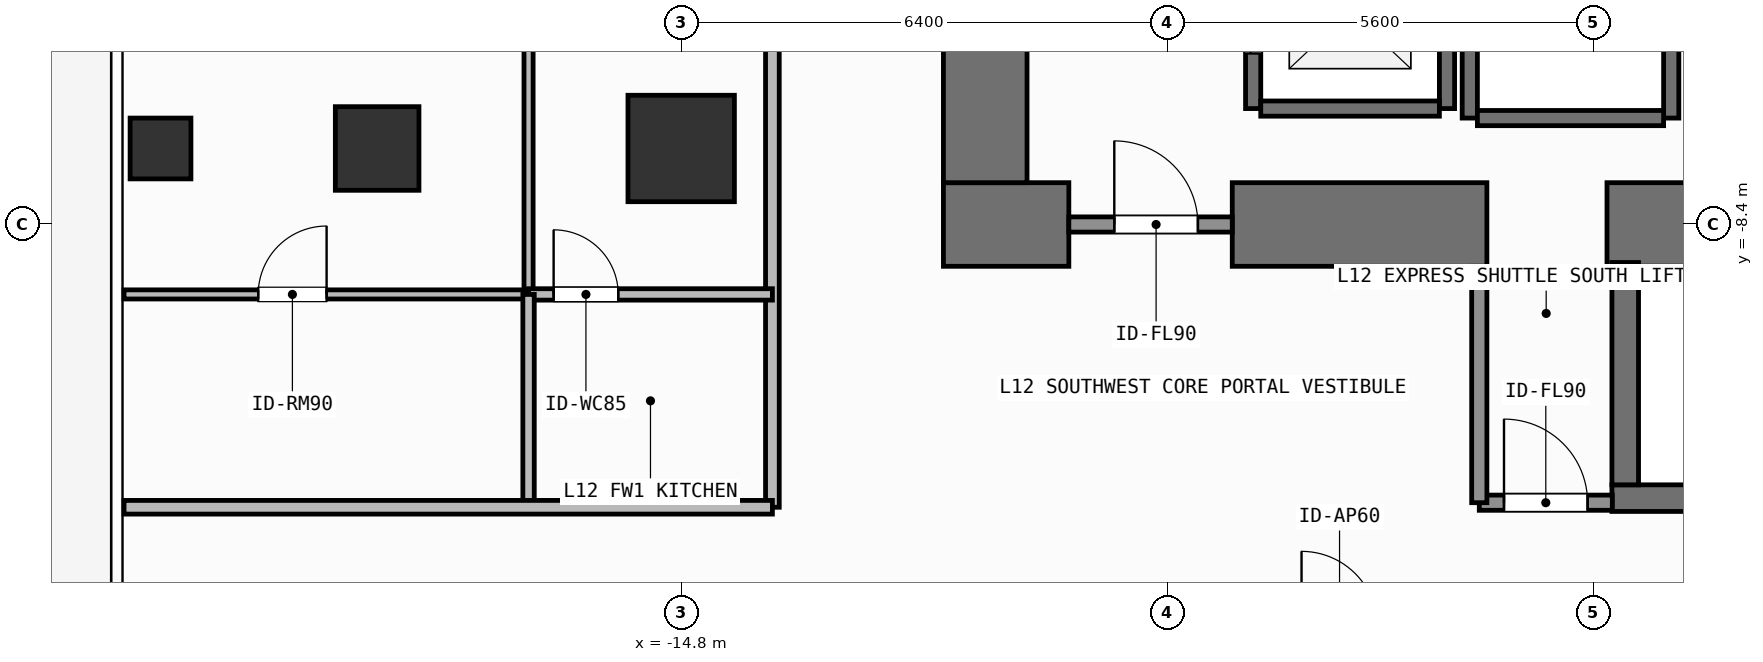
"""IFC4 building model, lengths in metres.
Left out: names, types, materials, properties, quantities, classifications, styles, units other than length and angle.
Written with IfcOpenShell. Run it as: python <this file> out.ifc"""

import sys

from ifc_helpers import new_model, si_unit, direction, frame, frame_2d, origin, origin_2d, place, context, subcontext, project, spatial, rectangle, hollow_rectangle, extrude, element, fill, save


model = new_model("IFC4")
c1 = context("Model", 3, precision=1e-05, world=origin(), true_north=direction((0.0, 1.0)))
c2 = subcontext(c1, "Body", "Model", "MODEL_VIEW")
j1 = project(units=[si_unit("LENGTHUNIT", "METRE"), si_unit("PLANEANGLEUNIT", "RADIAN")], contexts=[c1])
p1 = place(None, origin())
s1 = spatial("IfcSite", under=j1, at=p1, CompositionType="ELEMENT")
p2 = place(p1, origin())
s2 = spatial("IfcBuilding", under=s1, at=p2, CompositionType="ELEMENT")
p3 = place(p2, frame((0.0, 0.0, 46.2)))
s3 = spatial("IfcBuildingStorey", under=s2, at=p3, CompositionType="ELEMENT", Elevation=46.2)
p4 = place(p3, frame((-11.35, -8.4, 0.0), z_axis=(0.0, 0.0, 1.0), x_axis=(1.0, 0.0, 0.0)))
e1 = element("IfcWall", 1, at=p4, inside=s3, PredefinedType="SHEAR", context=c2, shape_type="SweptSolid", body=[
    extrude(rectangle(XDim=1.65, YDim=1.1, at=frame_2d((0.825, 0.0))), origin(), (0.0, 0.0, 1.0), 3.9),
])
p5 = place(p3, frame((-7.55, -8.4, 0.0), z_axis=(0.0, 0.0, 1.0), x_axis=(1.0, 0.0, 0.0)))
e2 = element("IfcWall", 2, at=p5, inside=s3, PredefinedType="SHEAR", context=c2, shape_type="SweptSolid", body=[
    extrude(rectangle(XDim=3.35, YDim=1.1, at=frame_2d((1.675, 0.0))), origin(), (0.0, 0.0, 1.0), 3.9),
])
p6 = place(p3, frame((-2.62, -8.4, 0.0), z_axis=(0.0, 0.0, 1.0), x_axis=(1.0, 0.0, 0.0)))
e3 = element("IfcWall", 3, at=p6, inside=s3, PredefinedType="SHEAR", context=c2, shape_type="SweptSolid", body=[
    extrude(rectangle(XDim=7.27, YDim=1.1, at=frame_2d((3.635, 0.0))), origin(), (0.0, 0.0, 1.0), 3.9),
])
p7 = place(p3, frame((-10.8, -7.85, 0.0), z_axis=(0.0, 0.0, 1.0), x_axis=(0.0, 1.0, 0.0)))
e4 = element("IfcWall", 4, at=p7, inside=s3, PredefinedType="SHEAR", context=c2, shape_type="SweptSolid", body=[
    extrude(rectangle(XDim=15.7, YDim=1.1, at=frame_2d((7.85, 0.0))), origin(), (0.0, 0.0, 1.0), 3.9),
])
p8 = place(p3, frame((-2.555, -12.0, 0.0), z_axis=(0.0, 0.0, 1.0), x_axis=(1.0, 0.0, 0.0)))
e5 = element("IfcWall", 5, at=p8, inside=s3, PredefinedType="SHEAR", context=c2, shape_type="SweptSolid", body=[
    extrude(rectangle(XDim=7.31, YDim=0.35, at=frame_2d((3.655, 0.0))), origin(), (0.0, 0.0, 1.0), 3.9),
])
p9 = place(p3, frame((-2.2, -8.988, 0.0), z_axis=(0.0, 0.0, 1.0), x_axis=(1.0, 0.0, 0.0)))
e6 = element("IfcWall", 6, at=p9, inside=s3, PredefinedType="SHEAR", context=c2, shape_type="SweptSolid", body=[
    extrude(rectangle(XDim=6.6, YDim=0.075, at=frame_2d((3.3, 0.0))), origin(), (0.0, 0.0, 1.0), 3.9),
])
p10 = place(p3, frame((-2.38, -11.825, 0.0), z_axis=(0.0, 0.0, 1.0), x_axis=(0.0, 1.0, 0.0)))
e7 = element("IfcWall", 7, at=p10, inside=s3, PredefinedType="SHEAR", context=c2, shape_type="SweptSolid", body=[
    extrude(rectangle(XDim=2.925, YDim=0.35, at=frame_2d((1.462, 0.0))), origin(), (0.0, 0.0, 1.0), 3.9),
])
p11 = place(p3, frame((-14.8, -7.4, 0.0), z_axis=(0.0, 0.0, 1.0), x_axis=(1.0, 0.0, 0.0)))
e8 = element("IfcColumn", 8, at=p11, inside=s3, PredefinedType="COLUMN", context=c2, shape_type="SweptSolid", body=[
    extrude(rectangle(XDim=1.4, YDim=1.4, at=origin_2d()), origin(), (0.0, 0.0, 1.0), 3.9),
])
p12 = place(p3, frame((-18.8, -7.4, 0.0), z_axis=(0.0, 0.0, 1.0), x_axis=(1.0, 0.0, 0.0)))
e9 = element("IfcColumn", 9, at=p12, inside=s3, PredefinedType="COLUMN", context=c2, shape_type="SweptSolid", body=[
    extrude(rectangle(XDim=1.1, YDim=1.1, at=origin_2d()), origin(), (0.0, 0.0, 1.0), 3.9),
])
p13 = place(p3, frame((-21.65, -7.4, 0.0), z_axis=(0.0, 0.0, 1.0), x_axis=(1.0, 0.0, 0.0)))
e10 = element("IfcColumn", 10, at=p13, inside=s3, PredefinedType="COLUMN", context=c2, shape_type="SweptSolid", body=[
    extrude(hollow_rectangle(XDim=0.8, YDim=0.8, WallThickness=0.036, at=origin_2d()), origin(), (0.0, 0.0, 1.0), 3.9),
])
p14 = place(p3, frame((-7.275, -6.875, 0.0), z_axis=(0.0, 0.0, 1.0), x_axis=(0.0, 1.0, 0.0)))
e11 = element("IfcWall", 11, at=p14, inside=s3, PredefinedType="SHEAR", context=c2, shape_type="SweptSolid", body=[
    extrude(rectangle(XDim=2.55, YDim=0.2, at=frame_2d((1.275, 0.0))), origin(), (0.0, 0.0, 1.0), 3.68),
])
p15 = place(p14, frame((0.725, 0.0, 0.0)))
e12 = element("IfcOpeningElement", 12, at=p15, cuts=e11, PredefinedType="OPENING", context=c2, shape_type="SweptSolid", body=[
    extrude(rectangle(XDim=1.1, YDim=2.2, at=frame_2d((0.55, 1.1))), frame((0.0, 0.11, 0.0), z_axis=(0.0, -1.0, 0.0), x_axis=(1.0, 0.0, 0.0)), (0.0, 0.0, 1.0), 0.22),
])
p16 = place(p3, frame((-4.725, -6.875, 0.0), z_axis=(0.0, 0.0, 1.0), x_axis=(0.0, 1.0, 0.0)))
e13 = element("IfcWall", 13, at=p16, inside=s3, PredefinedType="SHEAR", context=c2, shape_type="SweptSolid", body=[
    extrude(rectangle(XDim=2.55, YDim=0.2, at=frame_2d((1.275, 0.0))), origin(), (0.0, 0.0, 1.0), 3.68),
])
p17 = place(p3, frame((-7.175, -6.875, 0.0), z_axis=(0.0, 0.0, 1.0), x_axis=(1.0, 0.0, 0.0)))
e14 = element("IfcWall", 14, at=p17, inside=s3, PredefinedType="SHEAR", context=c2, shape_type="SweptSolid", body=[
    extrude(rectangle(XDim=2.35, YDim=0.2, at=frame_2d((1.175, 0.0))), origin(), (0.0, 0.0, 1.0), 3.68),
])
for number, where, z_axis, x_axis in (
    (15, (-4.425, -7.0, 0.0), (0.0, 0.0, 1.0), (0.0, 1.0, 0.0)),
    (16, (-1.775, -7.0, 0.0), (0.0, 0.0, 1.0), (0.0, 1.0, 0.0)),
):
    element("IfcWall", number, at=place(p3, frame(where, z_axis=z_axis, x_axis=x_axis)), inside=s3, PredefinedType="SHEAR", context=c2, shape_type="SweptSolid", body=[
        extrude(rectangle(XDim=2.8, YDim=0.2, at=frame_2d((1.4, 0.0))), origin(), (0.0, 0.0, 1.0), 3.68),
    ])
p18 = place(p3, frame((-4.325, -7.0, 0.0), z_axis=(0.0, 0.0, 1.0), x_axis=(1.0, 0.0, 0.0)))
e17 = element("IfcWall", 17, at=p18, inside=s3, PredefinedType="SHEAR", context=c2, shape_type="SweptSolid", body=[
    extrude(rectangle(XDim=2.45, YDim=0.2, at=frame_2d((1.225, 0.0))), origin(), (0.0, 0.0, 1.0), 3.68),
])
p19 = place(p3, frame((-9.7, -8.4, 0.0), z_axis=(0.0, 0.0, 1.0), x_axis=(1.0, 0.0, 0.0)))
e18 = element("IfcWall", 18, at=p19, inside=s3, PredefinedType="SOLIDWALL", context=c2, shape_type="SweptSolid", body=[
    extrude(rectangle(XDim=2.15, YDim=0.2, at=frame_2d((1.075, 0.0))), origin(), (0.0, 0.0, 1.0), 2.72),
])
p20 = place(p19, frame((0.598, 0.0, 0.0)))
e19 = element("IfcOpeningElement", 19, at=p20, cuts=e18, PredefinedType="OPENING", context=c2, shape_type="SweptSolid", body=[
    extrude(rectangle(XDim=1.1, YDim=2.15, at=frame_2d((0.55, 1.075))), frame((0.0, 0.11, 0.0), z_axis=(0.0, -1.0, 0.0), x_axis=(1.0, 0.0, 0.0)), (0.0, 0.0, 1.0), 0.22),
])
p21 = place(p3, frame((-4.3, -12.06, 0.0), z_axis=(0.0, 0.0, 1.0), x_axis=(1.0, 0.0, 0.0)))
e20 = element("IfcWall", 20, at=p21, inside=s3, PredefinedType="SOLIDWALL", context=c2, shape_type="SweptSolid", body=[
    extrude(rectangle(XDim=1.75, YDim=0.2, at=frame_2d((0.875, 0.0))), origin(), (0.0, 0.0, 1.0), 3.68),
])
p22 = place(p21, frame((0.325, 0.0, 0.0)))
e21 = element("IfcOpeningElement", 21, at=p22, cuts=e20, PredefinedType="OPENING", context=c2, shape_type="SweptSolid", body=[
    extrude(rectangle(XDim=1.1, YDim=2.15, at=frame_2d((0.55, 1.075))), frame((0.0, 0.11, 0.0), z_axis=(0.0, -1.0, 0.0), x_axis=(1.0, 0.0, 0.0)), (0.0, 0.0, 1.0), 0.22),
])
p23 = place(p3, frame((-13.6, -12.12, 0.0), z_axis=(0.0, 0.0, 1.0), x_axis=(0.0, 1.0, 0.0)))
e22 = element("IfcWall", 22, at=p23, inside=s3, PredefinedType="PARTITIONING", context=c2, shape_type="SweptSolid", body=[
    extrude(rectangle(XDim=24.24, YDim=0.18, at=frame_2d((12.12, 0.0))), origin(), (0.0, 0.0, 1.0), 3.68),
])
p24 = place(p23, frame((9.829, 0.0, 0.0)))
e23 = element("IfcOpeningElement", 23, at=p24, cuts=e22, PredefinedType="OPENING", context=c2, shape_type="SweptSolid", body=[
    extrude(rectangle(XDim=1.0, YDim=2.2, at=frame_2d((0.5, 1.1))), frame((0.0, 0.1, 0.0), z_axis=(0.0, -1.0, 0.0), x_axis=(1.0, 0.0, 0.0)), (0.0, 0.0, 1.0), 0.2),
])
p25 = place(p3, frame((-16.808, -9.32, 0.0), z_axis=(0.0, 0.0, 1.0), x_axis=(0.0, 1.0, 0.0)))
e24 = element("IfcWall", 24, at=p25, inside=s3, PredefinedType="PARTITIONING", context=c2, shape_type="SweptSolid", body=[
    extrude(rectangle(XDim=14.756, YDim=0.12, at=frame_2d((7.378, 0.0))), origin(), (0.0, 0.0, 1.0), 3.68),
])
p26 = place(p25, frame((6.928, 0.0, 0.0)))
e25 = element("IfcOpeningElement", 25, at=p26, cuts=e24, PredefinedType="OPENING", context=c2, shape_type="SweptSolid", body=[
    extrude(rectangle(XDim=0.9, YDim=2.1, at=frame_2d((0.45, 1.05))), frame((0.0, 0.07, 0.0), z_axis=(0.0, -1.0, 0.0), x_axis=(1.0, 0.0, 0.0)), (0.0, 0.0, 1.0), 0.14),
])
p27 = place(p3, frame((-16.808, -9.32, 0.0), z_axis=(0.0, 0.0, 1.0), x_axis=(1.0, 0.0, 0.0)))
e26 = element("IfcWall", 26, at=p27, inside=s3, PredefinedType="PARTITIONING", context=c2, shape_type="SweptSolid", body=[
    extrude(rectangle(XDim=3.208, YDim=0.15, at=frame_2d((1.604, 0.0))), origin(), (0.0, 0.0, 1.0), 3.68),
])
p28 = place(p27, frame((0.33, 0.0, 0.0)))
e27 = element("IfcOpeningElement", 27, at=p28, cuts=e26, PredefinedType="OPENING", context=c2, shape_type="SweptSolid", body=[
    extrude(rectangle(XDim=0.85, YDim=2.1, at=frame_2d((0.425, 1.05))), frame((0.0, 0.085, 0.0), z_axis=(0.0, -1.0, 0.0), x_axis=(1.0, 0.0, 0.0)), (0.0, 0.0, 1.0), 0.17),
])
p29 = place(p3, frame((-22.13, -9.32, 0.0), z_axis=(0.0, 0.0, 1.0), x_axis=(1.0, 0.0, 0.0)))
e28 = element("IfcWall", 28, at=p29, inside=s3, PredefinedType="PARTITIONING", context=c2, shape_type="SweptSolid", body=[
    extrude(rectangle(XDim=5.322, YDim=0.12, at=frame_2d((2.661, 0.0))), origin(), (0.0, 0.0, 1.0), 3.68),
])
p30 = place(p29, frame((1.765, 0.0, 0.0)))
e29 = element("IfcOpeningElement", 29, at=p30, cuts=e28, PredefinedType="OPENING", context=c2, shape_type="SweptSolid", body=[
    extrude(rectangle(XDim=0.9, YDim=2.1, at=frame_2d((0.45, 1.05))), frame((0.0, 0.07, 0.0), z_axis=(0.0, -1.0, 0.0), x_axis=(1.0, 0.0, 0.0)), (0.0, 0.0, 1.0), 0.14),
])
p31 = place(p3, frame((-4.3, -12.06, 0.0), z_axis=(0.0, 0.0, 1.0), x_axis=(0.0, 1.0, 0.0)))
e30 = element("IfcWall", 30, at=p31, inside=s3, PredefinedType="SOLIDWALL", context=c2, shape_type="SweptSolid", body=[
    extrude(rectangle(XDim=3.11, YDim=0.2, at=frame_2d((1.555, 0.0))), origin(), (0.0, 0.0, 1.0), 3.68),
])
p32 = place(p3, frame((-16.808, -12.12, 0.0), z_axis=(0.0, 0.0, 1.0), x_axis=(0.0, 1.0, 0.0)))
e31 = element("IfcWall", 31, at=p32, inside=s3, PredefinedType="PARTITIONING", context=c2, shape_type="SweptSolid", body=[
    extrude(rectangle(XDim=2.8, YDim=0.15, at=frame_2d((1.4, 0.0))), origin(), (0.0, 0.0, 1.0), 3.68),
])
p33 = place(p3, frame((-22.13, -12.12, 0.0), z_axis=(0.0, 0.0, 1.0), x_axis=(1.0, 0.0, 0.0)))
e32 = element("IfcWall", 32, at=p33, inside=s3, PredefinedType="PARTITIONING", context=c2, shape_type="SweptSolid", body=[
    extrude(rectangle(XDim=8.53, YDim=0.18, at=frame_2d((4.265, 0.0))), origin(), (0.0, 0.0, 1.0), 3.68),
])
p34 = place(p15, origin())
e33 = element("IfcDoor", 33, at=p34, inside=s3, OperationType="SLIDING_TO_LEFT", PredefinedType="DOOR", context=c2, shape_type="SweptSolid", body=[
    extrude(rectangle(XDim=1.1, YDim=2.2, at=frame_2d((0.55, 1.1))), frame((0.0, 0.025, 0.0), z_axis=(0.0, -1.0, 0.0), x_axis=(1.0, 0.0, 0.0)), (0.0, 0.0, 1.0), 0.05),
])
fill(e12, e33)
p35 = place(p20, origin())
e34 = element("IfcDoor", 34, at=p35, inside=s3, OperationType="SINGLE_SWING_LEFT", PredefinedType="DOOR", context=c2, shape_type="SweptSolid", body=[
    extrude(rectangle(XDim=1.1, YDim=2.15, at=frame_2d((0.55, 1.075))), frame((0.0, 0.025, 0.0), z_axis=(0.0, -1.0, 0.0), x_axis=(1.0, 0.0, 0.0)), (0.0, 0.0, 1.0), 0.05),
])
fill(e19, e34)
p36 = place(p22, origin())
e35 = element("IfcDoor", 35, at=p36, inside=s3, OperationType="SINGLE_SWING_LEFT", PredefinedType="DOOR", context=c2, shape_type="SweptSolid", body=[
    extrude(rectangle(XDim=1.1, YDim=2.15, at=frame_2d((0.55, 1.075))), frame((0.0, 0.025, 0.0), z_axis=(0.0, -1.0, 0.0), x_axis=(1.0, 0.0, 0.0)), (0.0, 0.0, 1.0), 0.05),
])
fill(e21, e35)
p37 = place(p28, origin())
e36 = element("IfcDoor", 36, at=p37, inside=s3, OperationType="SINGLE_SWING_LEFT", PredefinedType="DOOR", context=c2, shape_type="SweptSolid", body=[
    extrude(rectangle(XDim=0.85, YDim=2.1, at=frame_2d((0.425, 1.05))), frame((0.0, 0.025, 0.0), z_axis=(0.0, -1.0, 0.0), x_axis=(1.0, 0.0, 0.0)), (0.0, 0.0, 1.0), 0.05),
])
fill(e27, e36)
p38 = place(p30, origin())
e37 = element("IfcDoor", 37, at=p38, inside=s3, OperationType="SINGLE_SWING_RIGHT", PredefinedType="DOOR", context=c2, shape_type="SweptSolid", body=[
    extrude(rectangle(XDim=0.9, YDim=2.1, at=frame_2d((0.45, 1.05))), frame((0.0, 0.025, 0.0), z_axis=(0.0, -1.0, 0.0), x_axis=(1.0, 0.0, 0.0)), (0.0, 0.0, 1.0), 0.05),
])
fill(e29, e37)
save(model, sys.argv[1])
